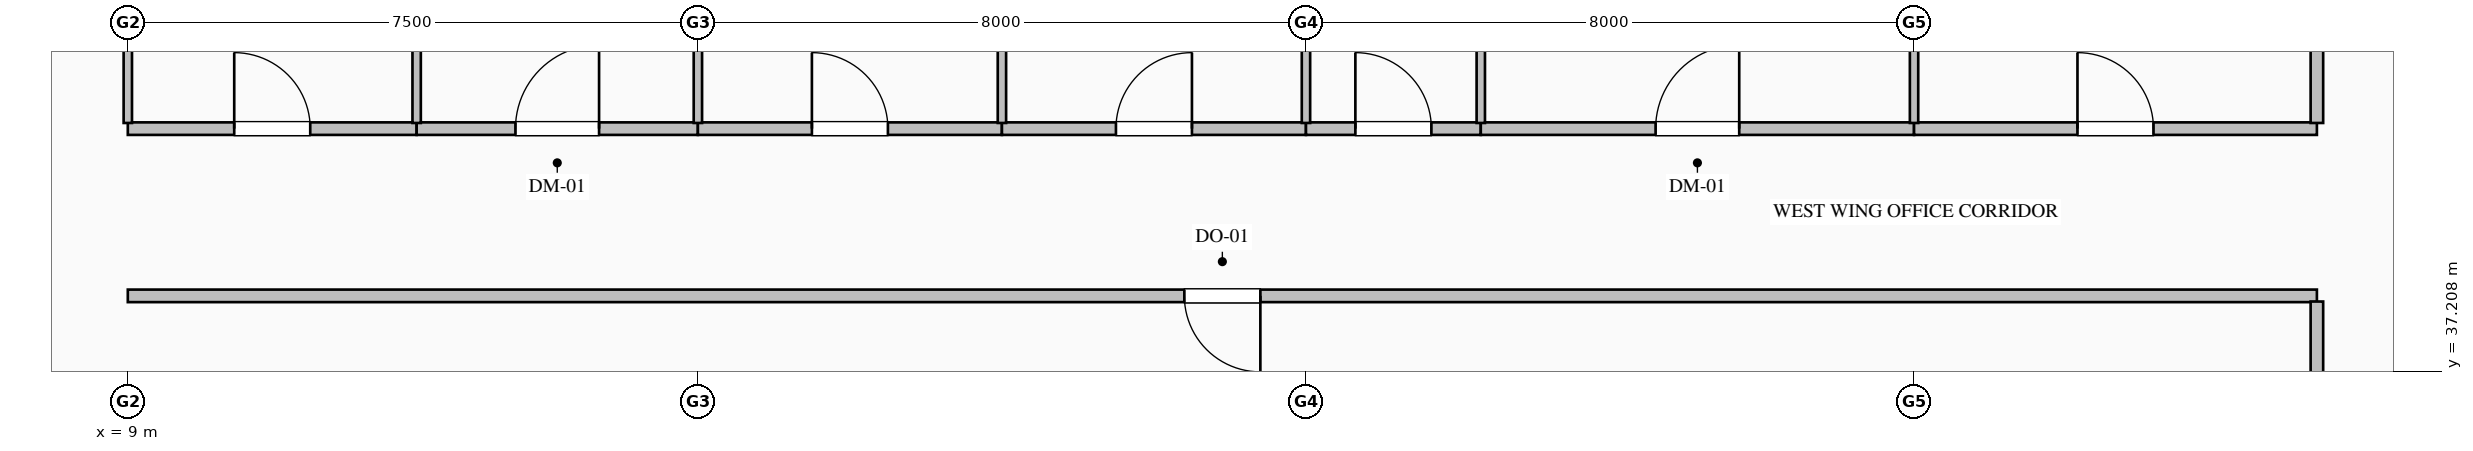
"""IFC4 building model, lengths in metres.
Left out: names, types, materials, properties, quantities, classifications, styles, units other than length and angle.
Written with IfcOpenShell. Run it as: python <this file> out.ifc"""

import sys

from ifc_helpers import new_model, si_unit, direction, frame, frame_2d, origin, place, context, subcontext, project, spatial, rectangle, extrude, element, fill, save


model = new_model("IFC4")
c1 = context("Model", 3, precision=1e-05, world=origin(), true_north=direction((0.0, 1.0)))
c2 = subcontext(c1, "Body", "Model", "MODEL_VIEW")
j1 = project(units=[si_unit("LENGTHUNIT", "METRE"), si_unit("PLANEANGLEUNIT", "RADIAN")], contexts=[c1])
p1 = place(None, origin())
s1 = spatial("IfcSite", under=j1, at=p1, CompositionType="ELEMENT")
p2 = place(p1, origin())
s2 = spatial("IfcBuilding", under=s1, at=p2, CompositionType="ELEMENT")
p3 = place(p2, frame((0.0, 0.0, 32.2)))
s3 = spatial("IfcBuildingStorey", under=s2, at=p3, CompositionType="ELEMENT", Elevation=32.2)
p4 = place(p3, frame((37.8, 38.2, 0.0), z_axis=(0.0, 0.0, 1.0), x_axis=(-1.0, 0.0, 0.0)))
e1 = element("IfcWall", 1, at=p4, inside=s3, PredefinedType="PARTITIONING", context=c2, shape_type="SweptSolid", body=[
    extrude(rectangle(XDim=28.8, YDim=0.165, at=frame_2d((14.4, 0.0))), origin(), (0.0, 0.0, 1.0), 3.75),
])
p5 = place(p4, frame((13.9, 0.0, 0.0)))
e2 = element("IfcOpeningElement", 2, at=p5, cuts=e1, PredefinedType="OPENING", context=c2, shape_type="SweptSolid", body=[
    extrude(rectangle(XDim=1.0, YDim=2.15, at=frame_2d((0.5, 1.075))), frame((0.0, 0.093, 0.0), z_axis=(0.0, -1.0, 0.0), x_axis=(1.0, 0.0, 0.0)), (0.0, 0.0, 1.0), 0.185),
])
p6 = place(p3, frame((9.0, 40.4, 0.0), z_axis=(0.0, 0.0, 1.0), x_axis=(1.0, 0.0, 0.0)))
e3 = element("IfcWall", 3, at=p6, inside=s3, PredefinedType="PARTITIONING", context=c2, shape_type="SweptSolid", body=[
    extrude(rectangle(XDim=3.8, YDim=0.165, at=frame_2d((1.9, 0.0))), origin(), (0.0, 0.0, 1.0), 3.75),
])
p7 = place(p6, frame((1.4, 0.0, 0.0)))
e4 = element("IfcOpeningElement", 4, at=p7, cuts=e3, PredefinedType="OPENING", context=c2, shape_type="SweptSolid", body=[
    extrude(rectangle(XDim=1.0, YDim=2.15, at=frame_2d((0.5, 1.075))), frame((0.0, 0.093, 0.0), z_axis=(0.0, -1.0, 0.0), x_axis=(1.0, 0.0, 0.0)), (0.0, 0.0, 1.0), 0.185),
])
p8 = place(p3, frame((12.8, 40.4, 0.0), z_axis=(0.0, 0.0, 1.0), x_axis=(1.0, 0.0, 0.0)))
e5 = element("IfcWall", 5, at=p8, inside=s3, PredefinedType="PARTITIONING", context=c2, shape_type="SweptSolid", body=[
    extrude(rectangle(XDim=3.7, YDim=0.165, at=frame_2d((1.85, 0.0))), origin(), (0.0, 0.0, 1.0), 3.75),
])
p9 = place(p8, frame((1.3, 0.0, 0.0)))
e6 = element("IfcOpeningElement", 6, at=p9, cuts=e5, PredefinedType="OPENING", context=c2, shape_type="SweptSolid", body=[
    extrude(rectangle(XDim=1.1, YDim=2.2, at=frame_2d((0.55, 1.1))), frame((0.0, 0.093, 0.0), z_axis=(0.0, -1.0, 0.0), x_axis=(1.0, 0.0, 0.0)), (0.0, 0.0, 1.0), 0.185),
])
p10 = place(p3, frame((16.5, 40.4, 0.0), z_axis=(0.0, 0.0, 1.0), x_axis=(1.0, 0.0, 0.0)))
e7 = element("IfcWall", 7, at=p10, inside=s3, PredefinedType="PARTITIONING", context=c2, shape_type="SweptSolid", body=[
    extrude(rectangle(XDim=4.0, YDim=0.165, at=frame_2d((2.0, 0.0))), origin(), (0.0, 0.0, 1.0), 3.75),
])
p11 = place(p10, frame((1.5, 0.0, 0.0)))
e8 = element("IfcOpeningElement", 8, at=p11, cuts=e7, PredefinedType="OPENING", context=c2, shape_type="SweptSolid", body=[
    extrude(rectangle(XDim=1.0, YDim=2.15, at=frame_2d((0.5, 1.075))), frame((0.0, 0.093, 0.0), z_axis=(0.0, -1.0, 0.0), x_axis=(1.0, 0.0, 0.0)), (0.0, 0.0, 1.0), 0.185),
])
p12 = place(p3, frame((20.5, 40.4, 0.0), z_axis=(0.0, 0.0, 1.0), x_axis=(1.0, 0.0, 0.0)))
e9 = element("IfcWall", 9, at=p12, inside=s3, PredefinedType="PARTITIONING", context=c2, shape_type="SweptSolid", body=[
    extrude(rectangle(XDim=4.0, YDim=0.165, at=frame_2d((2.0, 0.0))), origin(), (0.0, 0.0, 1.0), 3.75),
])
p13 = place(p12, frame((1.5, 0.0, 0.0)))
e10 = element("IfcOpeningElement", 10, at=p13, cuts=e9, PredefinedType="OPENING", context=c2, shape_type="SweptSolid", body=[
    extrude(rectangle(XDim=1.0, YDim=2.15, at=frame_2d((0.5, 1.075))), frame((0.0, 0.093, 0.0), z_axis=(0.0, -1.0, 0.0), x_axis=(1.0, 0.0, 0.0)), (0.0, 0.0, 1.0), 0.185),
])
p14 = place(p3, frame((24.5, 40.4, 0.0), z_axis=(0.0, 0.0, 1.0), x_axis=(1.0, 0.0, 0.0)))
e11 = element("IfcWall", 11, at=p14, inside=s3, PredefinedType="PARTITIONING", context=c2, shape_type="SweptSolid", body=[
    extrude(rectangle(XDim=2.3, YDim=0.165, at=frame_2d((1.15, 0.0))), origin(), (0.0, 0.0, 1.0), 3.75),
])
p15 = place(p14, frame((0.65, 0.0, 0.0)))
e12 = element("IfcOpeningElement", 12, at=p15, cuts=e11, PredefinedType="OPENING", context=c2, shape_type="SweptSolid", body=[
    extrude(rectangle(XDim=1.0, YDim=2.15, at=frame_2d((0.5, 1.075))), frame((0.0, 0.093, 0.0), z_axis=(0.0, -1.0, 0.0), x_axis=(1.0, 0.0, 0.0)), (0.0, 0.0, 1.0), 0.185),
])
p16 = place(p3, frame((26.8, 40.4, 0.0), z_axis=(0.0, 0.0, 1.0), x_axis=(1.0, 0.0, 0.0)))
e13 = element("IfcWall", 13, at=p16, inside=s3, PredefinedType="PARTITIONING", context=c2, shape_type="SweptSolid", body=[
    extrude(rectangle(XDim=5.7, YDim=0.165, at=frame_2d((2.85, 0.0))), origin(), (0.0, 0.0, 1.0), 3.75),
])
p17 = place(p16, frame((2.3, 0.0, 0.0)))
e14 = element("IfcOpeningElement", 14, at=p17, cuts=e13, PredefinedType="OPENING", context=c2, shape_type="SweptSolid", body=[
    extrude(rectangle(XDim=1.1, YDim=2.2, at=frame_2d((0.55, 1.1))), frame((0.0, 0.093, 0.0), z_axis=(0.0, -1.0, 0.0), x_axis=(1.0, 0.0, 0.0)), (0.0, 0.0, 1.0), 0.185),
])
p18 = place(p3, frame((32.5, 40.4, 0.0), z_axis=(0.0, 0.0, 1.0), x_axis=(1.0, 0.0, 0.0)))
e15 = element("IfcWall", 15, at=p18, inside=s3, PredefinedType="PARTITIONING", context=c2, shape_type="SweptSolid", body=[
    extrude(rectangle(XDim=5.3, YDim=0.165, at=frame_2d((2.65, 0.0))), origin(), (0.0, 0.0, 1.0), 3.75),
])
p19 = place(p18, frame((2.15, 0.0, 0.0)))
e16 = element("IfcOpeningElement", 16, at=p19, cuts=e15, PredefinedType="OPENING", context=c2, shape_type="SweptSolid", body=[
    extrude(rectangle(XDim=1.0, YDim=2.15, at=frame_2d((0.5, 1.075))), frame((0.0, 0.093, 0.0), z_axis=(0.0, -1.0, 0.0), x_axis=(1.0, 0.0, 0.0)), (0.0, 0.0, 1.0), 0.185),
])
p20 = place(p3, frame((37.8, 31.6, 0.0), z_axis=(0.0, 0.0, 1.0), x_axis=(0.0, 1.0, 0.0)))
e17 = element("IfcWall", 17, at=p20, inside=s3, PredefinedType="PARTITIONING", context=c2, shape_type="SweptSolid", body=[
    extrude(rectangle(XDim=6.525, YDim=0.165, at=frame_2d((3.263, 0.0))), origin(), (0.0, 0.0, 1.0), 3.75),
])
p21 = place(p3, frame((37.8, 40.475, 0.0), z_axis=(0.0, 0.0, 1.0), x_axis=(0.0, 1.0, 0.0)))
e18 = element("IfcWall", 18, at=p21, inside=s3, PredefinedType="PARTITIONING", context=c2, shape_type="SweptSolid", body=[
    extrude(rectangle(XDim=3.651, YDim=0.165, at=frame_2d((1.825, 0.0))), origin(), (0.0, 0.0, 1.0), 3.75),
])
p22 = place(p3, frame((9.0, 51.648, 0.0), z_axis=(0.0, 0.0, 1.0), x_axis=(0.0, -1.0, 0.0)))
e19 = element("IfcWall", 19, at=p22, inside=s3, PredefinedType="MOVABLE", context=c2, shape_type="SweptSolid", body=[
    extrude(rectangle(XDim=11.173, YDim=0.11, at=frame_2d((5.587, 0.0))), origin(), (0.0, 0.0, 1.0), 3.042),
])
p23 = place(p22, frame((5.087, 0.0, 0.0)))
e20 = element("IfcOpeningElement", 20, at=p23, cuts=e19, PredefinedType="OPENING", context=c2, shape_type="SweptSolid", body=[
    extrude(rectangle(XDim=1.0, YDim=2.15, at=frame_2d((0.5, 1.075))), frame((0.0, 0.065, 0.0), z_axis=(0.0, -1.0, 0.0), x_axis=(1.0, 0.0, 0.0)), (0.0, 0.0, 1.0), 0.13),
])
p24 = place(p3, frame((12.8, 51.648, 0.0), z_axis=(0.0, 0.0, 1.0), x_axis=(0.0, -1.0, 0.0)))
e21 = element("IfcWall", 21, at=p24, inside=s3, PredefinedType="MOVABLE", context=c2, shape_type="SweptSolid", body=[
    extrude(rectangle(XDim=11.173, YDim=0.11, at=frame_2d((5.587, 0.0))), origin(), (0.0, 0.0, 1.0), 3.75),
])
p25 = place(p3, frame((16.5, 51.648, 0.0), z_axis=(0.0, 0.0, 1.0), x_axis=(0.0, -1.0, 0.0)))
e22 = element("IfcWall", 22, at=p25, inside=s3, PredefinedType="MOVABLE", context=c2, shape_type="SweptSolid", body=[
    extrude(rectangle(XDim=11.173, YDim=0.11, at=frame_2d((5.587, 0.0))), origin(), (0.0, 0.0, 1.0), 3.042),
])
p26 = place(p3, frame((20.5, 51.648, 0.0), z_axis=(0.0, 0.0, 1.0), x_axis=(0.0, -1.0, 0.0)))
e23 = element("IfcWall", 23, at=p26, inside=s3, PredefinedType="MOVABLE", context=c2, shape_type="SweptSolid", body=[
    extrude(rectangle(XDim=11.173, YDim=0.11, at=frame_2d((5.587, 0.0))), origin(), (0.0, 0.0, 1.0), 3.75),
])
p27 = place(p3, frame((24.5, 51.648, 0.0), z_axis=(0.0, 0.0, 1.0), x_axis=(0.0, -1.0, 0.0)))
e24 = element("IfcWall", 24, at=p27, inside=s3, PredefinedType="MOVABLE", context=c2, shape_type="SweptSolid", body=[
    extrude(rectangle(XDim=11.173, YDim=0.11, at=frame_2d((5.587, 0.0))), origin(), (0.0, 0.0, 1.0), 3.042),
])
for number, where, z_axis, x_axis in (
    (25, (26.8, 51.648, 0.0), (0.0, 0.0, 1.0), (0.0, -1.0, 0.0)),
    (26, (32.5, 51.648, 0.0), (0.0, 0.0, 1.0), (0.0, -1.0, 0.0)),
):
    element("IfcWall", number, at=place(p3, frame(where, z_axis=z_axis, x_axis=x_axis)), inside=s3, PredefinedType="MOVABLE", context=c2, shape_type="SweptSolid", body=[
        extrude(rectangle(XDim=11.173, YDim=0.11, at=frame_2d((5.587, 0.0))), origin(), (0.0, 0.0, 1.0), 3.75),
    ])
p28 = place(p5, origin())
e27 = element("IfcDoor", 27, at=p28, inside=s3, OperationType="SINGLE_SWING_LEFT", PredefinedType="DOOR", context=c2, shape_type="SweptSolid", body=[
    extrude(rectangle(XDim=1.0, YDim=2.15, at=frame_2d((0.5, 1.075))), frame((0.0, 0.025, 0.0), z_axis=(0.0, -1.0, 0.0), x_axis=(1.0, 0.0, 0.0)), (0.0, 0.0, 1.0), 0.05),
])
fill(e2, e27)
p29 = place(p7, origin())
e28 = element("IfcDoor", 28, at=p29, inside=s3, OperationType="SINGLE_SWING_LEFT", PredefinedType="DOOR", context=c2, shape_type="SweptSolid", body=[
    extrude(rectangle(XDim=1.0, YDim=2.15, at=frame_2d((0.5, 1.075))), frame((0.0, 0.025, 0.0), z_axis=(0.0, -1.0, 0.0), x_axis=(1.0, 0.0, 0.0)), (0.0, 0.0, 1.0), 0.05),
])
fill(e4, e28)
p30 = place(p9, origin())
e29 = element("IfcDoor", 29, at=p30, inside=s3, OperationType="SINGLE_SWING_RIGHT", PredefinedType="DOOR", context=c2, shape_type="SweptSolid", body=[
    extrude(rectangle(XDim=1.1, YDim=2.2, at=frame_2d((0.55, 1.1))), frame((0.0, 0.025, 0.0), z_axis=(0.0, -1.0, 0.0), x_axis=(1.0, 0.0, 0.0)), (0.0, 0.0, 1.0), 0.05),
])
fill(e6, e29)
p31 = place(p11, origin())
e30 = element("IfcDoor", 30, at=p31, inside=s3, OperationType="SINGLE_SWING_LEFT", PredefinedType="DOOR", context=c2, shape_type="SweptSolid", body=[
    extrude(rectangle(XDim=1.0, YDim=2.15, at=frame_2d((0.5, 1.075))), frame((0.0, 0.025, 0.0), z_axis=(0.0, -1.0, 0.0), x_axis=(1.0, 0.0, 0.0)), (0.0, 0.0, 1.0), 0.05),
])
fill(e8, e30)
p32 = place(p13, origin())
e31 = element("IfcDoor", 31, at=p32, inside=s3, OperationType="SINGLE_SWING_RIGHT", PredefinedType="DOOR", context=c2, shape_type="SweptSolid", body=[
    extrude(rectangle(XDim=1.0, YDim=2.15, at=frame_2d((0.5, 1.075))), frame((0.0, 0.025, 0.0), z_axis=(0.0, -1.0, 0.0), x_axis=(1.0, 0.0, 0.0)), (0.0, 0.0, 1.0), 0.05),
])
fill(e10, e31)
p33 = place(p15, origin())
e32 = element("IfcDoor", 32, at=p33, inside=s3, OperationType="SINGLE_SWING_LEFT", PredefinedType="DOOR", context=c2, shape_type="SweptSolid", body=[
    extrude(rectangle(XDim=1.0, YDim=2.15, at=frame_2d((0.5, 1.075))), frame((0.0, 0.025, 0.0), z_axis=(0.0, -1.0, 0.0), x_axis=(1.0, 0.0, 0.0)), (0.0, 0.0, 1.0), 0.05),
])
fill(e12, e32)
p34 = place(p17, origin())
e33 = element("IfcDoor", 33, at=p34, inside=s3, OperationType="SINGLE_SWING_RIGHT", PredefinedType="DOOR", context=c2, shape_type="SweptSolid", body=[
    extrude(rectangle(XDim=1.1, YDim=2.2, at=frame_2d((0.55, 1.1))), frame((0.0, 0.025, 0.0), z_axis=(0.0, -1.0, 0.0), x_axis=(1.0, 0.0, 0.0)), (0.0, 0.0, 1.0), 0.05),
])
fill(e14, e33)
p35 = place(p19, origin())
e34 = element("IfcDoor", 34, at=p35, inside=s3, OperationType="SINGLE_SWING_LEFT", PredefinedType="DOOR", context=c2, shape_type="SweptSolid", body=[
    extrude(rectangle(XDim=1.0, YDim=2.15, at=frame_2d((0.5, 1.075))), frame((0.0, 0.025, 0.0), z_axis=(0.0, -1.0, 0.0), x_axis=(1.0, 0.0, 0.0)), (0.0, 0.0, 1.0), 0.05),
])
fill(e16, e34)
save(model, sys.argv[1])
